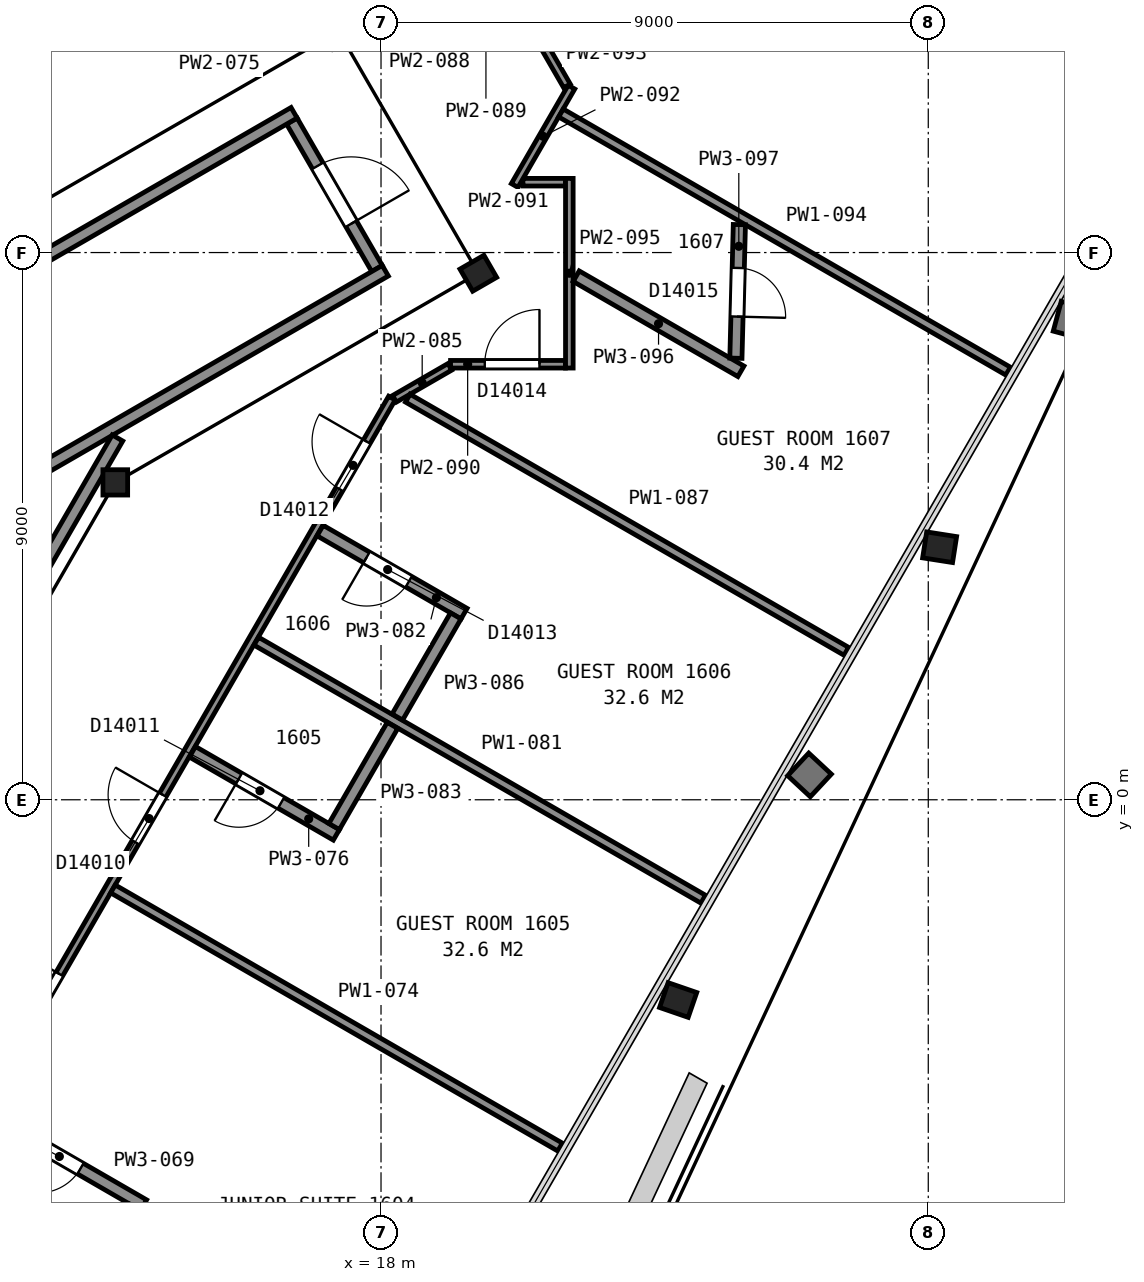
"""IFC4 building model, lengths in metres.
Left out: names, types, materials, properties, quantities, classifications, styles, units other than length and angle.
Written with IfcOpenShell. Run it as: python <this file> out.ifc"""

import sys

from ifc_helpers import new_model, si_unit, direction, frame, frame_2d, origin, origin_2d, place, context, subcontext, project, spatial, rectangle, i_section, extrude, element, fill, save


model = new_model("IFC4")
c1 = context("Model", 3, precision=1e-05, world=origin(), true_north=direction((0.0, 1.0)))
c2 = subcontext(c1, "Body", "Model", "MODEL_VIEW")
j1 = project(units=[si_unit("LENGTHUNIT", "METRE"), si_unit("PLANEANGLEUNIT", "RADIAN")], contexts=[c1])
p1 = place(None, origin())
s1 = spatial("IfcSite", under=j1, at=p1, CompositionType="ELEMENT")
p2 = place(p1, origin())
s2 = spatial("IfcBuilding", under=s1, at=p2, CompositionType="ELEMENT")
p3 = place(p2, frame((0.0, 0.0, 72.8)))
s3 = spatial("IfcBuildingStorey", under=s2, at=p3, CompositionType="ELEMENT", Elevation=72.8)
p4 = place(p3, frame((22.792, -3.261, 0.025), z_axis=(0.080240281001, -0.02768323956, 0.996391055536), x_axis=(-0.500071385104, -0.865832358147, 0.016215344149)))
e1 = element("IfcColumn", 1, at=p4, inside=s3, PredefinedType="COLUMN", context=c2, shape_type="SweptSolid", body=[
    extrude(i_section(OverallWidth=0.432, OverallDepth=0.498, WebThickness=0.056, FlangeThickness=0.089, FilletRadius=0.015, at=origin_2d()), origin(), (0.0, 0.0, 1.0), 3.563),
])
p5 = place(p3, frame((27.082, 4.17, 0.025), z_axis=(0.088495071019, -0.013835916676, 0.995980516785), x_axis=(-0.499820680913, -0.865523193885, 0.032386537004)))
e2 = element("IfcColumn", 2, at=p5, inside=s3, PredefinedType="COLUMN", context=c2, shape_type="SweptSolid", body=[
    extrude(i_section(OverallWidth=0.432, OverallDepth=0.498, WebThickness=0.056, FlangeThickness=0.089, FilletRadius=0.015, at=origin_2d()), origin(), (0.0, 0.0, 1.0), 3.564),
])
p6 = place(p3, frame((13.63, 5.22, 0.0), z_axis=(0.0, 0.0, 1.0), x_axis=(1.0, 0.0, 0.0)))
e3 = element("IfcColumn", 3, at=p6, inside=s3, PredefinedType="COLUMN", context=c2, shape_type="SweptSolid", body=[
    extrude(i_section(OverallWidth=0.406, OverallDepth=0.417, WebThickness=0.03, FlangeThickness=0.048, FilletRadius=0.015, at=origin_2d()), origin(), (0.0, 0.0, 1.0), 3.6),
])
p7 = place(p3, frame((19.6, 8.66, 0.0), z_axis=(0.0, 0.0, 1.0), x_axis=(0.5, -0.866025403784, 0.0)))
e4 = element("IfcColumn", 4, at=p7, inside=s3, PredefinedType="COLUMN", context=c2, shape_type="SweptSolid", body=[
    extrude(i_section(OverallWidth=0.419, OverallDepth=0.455, WebThickness=0.042, FlangeThickness=0.068, FilletRadius=0.015, at=origin_2d()), origin(), (0.0, 0.0, 1.0), 3.6),
])
p8 = place(p3, frame((17.934, 8.738, 0.0), z_axis=(0.0, 0.0, 1.0), x_axis=(-0.49998411664, 0.866034573852, 0.0)))
e5 = element("IfcWall", 5, at=p8, inside=s3, PredefinedType="PARTITIONING", context=c2, shape_type="SweptSolid", body=[
    extrude(rectangle(XDim=2.8, YDim=0.2, at=frame_2d((1.4, 0.0))), origin(), (0.0, 0.0, 1.0), 3.35),
])
p9 = place(p8, frame((0.85, 0.0, 0.0)))
e6 = element("IfcOpeningElement", 6, at=p9, cuts=e5, PredefinedType="OPENING", context=c2, shape_type="SweptSolid", body=[
    extrude(rectangle(XDim=1.1, YDim=2.1, at=frame_2d((0.55, 1.05))), frame((0.0, 0.11, 0.0), z_axis=(0.0, -1.0, 0.0), x_axis=(1.0, 0.0, 0.0)), (0.0, 0.0, 1.0), 0.22),
])
for number, where, z_axis, x_axis in (
    (7, (6.178, 5.299, 0.0), (0.0, 0.0, 1.0), (0.866, 0.5, 0.0)),
    (8, (7.678, 2.701, 0.0), (0.0, 0.0, 1.0), (0.866, 0.5, 0.0)),
):
    element("IfcWall", number, at=place(p3, frame(where, z_axis=z_axis, x_axis=x_axis)), inside=s3, PredefinedType="PARTITIONING", context=c2, shape_type="SweptSolid", body=[
        extrude(rectangle(XDim=12.0, YDim=0.2, at=frame_2d((6.0, 0.0))), origin(), (0.0, 0.0, 1.0), 3.35),
    ])
p10 = place(p3, frame((8.492, -3.012, 0.0), z_axis=(0.0, 0.0, 1.0), x_axis=(0.499972957231, 0.866041016371, 0.0)))
e9 = element("IfcWall", 9, at=p10, inside=s3, PredefinedType="PARTITIONING", context=c2, shape_type="SweptSolid", body=[
    extrude(rectangle(XDim=10.349, YDim=0.2, at=frame_2d((5.174, 0.0))), origin(), (0.0, 0.0, 1.0), 3.35),
])
p11 = place(p3, frame((18.179, 6.606, 0.0), z_axis=(0.0, 0.0, 1.0), x_axis=(-0.500003973642, -0.866023109589, 0.0)))
e10 = element("IfcWall", 10, at=p11, inside=s3, PredefinedType="PARTITIONING", context=c2, shape_type="SweptSolid", body=[
    extrude(rectangle(XDim=28.826, YDim=0.125, at=frame_2d((14.413, 0.0))), origin(), (0.0, 0.0, 1.0), 2.613),
])
p12 = place(p11, frame((21.501, 0.0, 0.0)))
e11 = element("IfcOpeningElement", 11, at=p12, cuts=e10, PredefinedType="OPENING", context=c2, shape_type="SweptSolid", body=[
    extrude(rectangle(XDim=0.9, YDim=2.1, at=frame_2d((0.45, 1.05))), frame((0.0, 0.073, 0.0), z_axis=(0.0, -1.0, 0.0), x_axis=(1.0, 0.0, 0.0)), (0.0, 0.0, 1.0), 0.145),
])
p13 = place(p11, frame((18.894, 0.0, 0.0)))
e12 = element("IfcOpeningElement", 12, at=p13, cuts=e10, PredefinedType="OPENING", context=c2, shape_type="SweptSolid", body=[
    extrude(rectangle(XDim=0.9, YDim=2.1, at=frame_2d((0.45, 1.05))), frame((0.0, 0.073, 0.0), z_axis=(0.0, -1.0, 0.0), x_axis=(1.0, 0.0, 0.0)), (0.0, 0.0, 1.0), 0.145),
])
p14 = place(p11, frame((10.937, 0.0, 0.0)))
e13 = element("IfcOpeningElement", 13, at=p14, cuts=e10, PredefinedType="OPENING", context=c2, shape_type="SweptSolid", body=[
    extrude(rectangle(XDim=0.9, YDim=2.1, at=frame_2d((0.45, 1.05))), frame((0.0, 0.073, 0.0), z_axis=(0.0, -1.0, 0.0), x_axis=(1.0, 0.0, 0.0)), (0.0, 0.0, 1.0), 0.145),
])
p15 = place(p11, frame((7.535, 0.0, 0.0)))
e14 = element("IfcOpeningElement", 14, at=p15, cuts=e10, PredefinedType="OPENING", context=c2, shape_type="SweptSolid", body=[
    extrude(rectangle(XDim=0.9, YDim=2.1, at=frame_2d((0.45, 1.05))), frame((0.0, 0.073, 0.0), z_axis=(0.0, -1.0, 0.0), x_axis=(1.0, 0.0, 0.0)), (0.0, 0.0, 1.0), 0.145),
])
p16 = place(p11, frame((0.827, 0.0, 0.0)))
e15 = element("IfcOpeningElement", 15, at=p16, cuts=e10, PredefinedType="OPENING", context=c2, shape_type="SweptSolid", body=[
    extrude(rectangle(XDim=0.9, YDim=2.1, at=frame_2d((0.45, 1.05))), frame((0.0, 0.073, 0.0), z_axis=(0.0, -1.0, 0.0), x_axis=(1.0, 0.0, 0.0)), (0.0, 0.0, 1.0), 0.145),
])
p17 = place(p3, frame((14.096, -6.667, 0.0), z_axis=(0.0, 0.0, 1.0), x_axis=(-0.866023634079, 0.500003065207, 0.0)))
e16 = element("IfcWall", 16, at=p17, inside=s3, PredefinedType="PARTITIONING", context=c2, shape_type="SweptSolid", body=[
    extrude(rectangle(XDim=3.038, YDim=0.2, at=frame_2d((1.519, 0.0))), origin(), (0.0, 0.0, 1.0), 2.613),
])
p18 = place(p17, frame((1.2, 0.0, 0.0)))
e17 = element("IfcOpeningElement", 17, at=p18, cuts=e16, PredefinedType="OPENING", context=c2, shape_type="SweptSolid", body=[
    extrude(rectangle(XDim=0.8, YDim=2.1, at=frame_2d((0.4, 1.05))), frame((0.0, 0.11, 0.0), z_axis=(0.0, -1.0, 0.0), x_axis=(1.0, 0.0, 0.0)), (0.0, 0.0, 1.0), 0.22),
])
p19 = place(p3, frame((13.591, -1.466, 0.0), z_axis=(0.0, 0.0, 1.0), x_axis=(0.866022790583, -0.50000452617, 0.0)))
e18 = element("IfcWall", 18, at=p19, inside=s3, PredefinedType="PARTITIONING", context=c2, shape_type="SweptSolid", body=[
    extrude(rectangle(XDim=8.491, YDim=0.15, at=frame_2d((4.246, 0.0))), origin(), (0.0, 0.0, 1.0), 2.613),
])
p20 = place(p3, frame((14.898, 0.789, 0.0), z_axis=(0.0, 0.0, 1.0), x_axis=(0.866102295869, -0.499866795347, 0.0)))
e19 = element("IfcWall", 19, at=p20, inside=s3, PredefinedType="PARTITIONING", context=c2, shape_type="SweptSolid", body=[
    extrude(rectangle(XDim=2.733, YDim=0.2, at=frame_2d((1.367, 0.0))), origin(), (0.0, 0.0, 1.0), 2.613),
])
p21 = place(p20, frame((0.883, 0.0, 0.0)))
e20 = element("IfcOpeningElement", 20, at=p21, cuts=e19, PredefinedType="OPENING", context=c2, shape_type="SweptSolid", body=[
    extrude(rectangle(XDim=0.8, YDim=2.1, at=frame_2d((0.4, 1.05))), frame((0.0, 0.11, 0.0), z_axis=(0.0, -1.0, 0.0), x_axis=(1.0, 0.0, 0.0)), (0.0, 0.0, 1.0), 0.22),
])
p22 = place(p3, frame((15.948, 2.608, 0.0), z_axis=(0.0, 0.0, 1.0), x_axis=(0.866059124033, -0.499941590267, 0.0)))
e21 = element("IfcWall", 21, at=p22, inside=s3, PredefinedType="PARTITIONING", context=c2, shape_type="SweptSolid", body=[
    extrude(rectangle(XDim=8.487, YDim=0.15, at=frame_2d((4.243, 0.0))), origin(), (0.0, 0.0, 1.0), 2.613),
])
p23 = place(p3, frame((19.366, 3.061, 0.0), z_axis=(0.0, 0.0, 1.0), x_axis=(-0.866102295869, 0.499866795347, 0.0)))
e22 = element("IfcWall", 22, at=p23, inside=s3, PredefinedType="PARTITIONING", context=c2, shape_type="SweptSolid", body=[
    extrude(rectangle(XDim=2.733, YDim=0.2, at=frame_2d((1.367, 0.0))), origin(), (0.0, 0.0, 1.0), 2.613),
])
p24 = place(p23, frame((1.051, 0.0, 0.0)))
e23 = element("IfcOpeningElement", 23, at=p24, cuts=e22, PredefinedType="OPENING", context=c2, shape_type="SweptSolid", body=[
    extrude(rectangle(XDim=0.8, YDim=2.1, at=frame_2d((0.4, 1.05))), frame((0.0, 0.11, 0.0), z_axis=(0.0, -1.0, 0.0), x_axis=(1.0, 0.0, 0.0)), (0.0, 0.0, 1.0), 0.22),
])
p25 = place(p3, frame((17.229, -0.44, 0.0), z_axis=(0.0, 0.0, 1.0), x_axis=(0.499667418833, 0.866217334482, 0.0)))
e24 = element("IfcWall", 24, at=p25, inside=s3, PredefinedType="PARTITIONING", context=c2, shape_type="SweptSolid", body=[
    extrude(rectangle(XDim=1.92, YDim=0.2, at=frame_2d((0.96, 0.0))), origin(), (0.0, 0.0, 1.0), 2.613),
])
p26 = place(p3, frame((18.222, 6.594, 0.0), z_axis=(0.0, 0.0, 1.0), x_axis=(0.865876245925, 0.500258260045, 0.0)))
e25 = element("IfcWall", 25, at=p26, inside=s3, PredefinedType="PARTITIONING", context=c2, shape_type="SweptSolid", body=[
    extrude(rectangle(XDim=1.052, YDim=0.125, at=frame_2d((0.526, 0.0))), origin(), (0.0, 0.0, 1.0), 2.613),
])
p27 = place(p3, frame((18.269, 1.361, 0.0), z_axis=(0.0, 0.0, 1.0), x_axis=(0.499993829411, 0.866028966346, 0.0)))
e26 = element("IfcWall", 26, at=p27, inside=s3, PredefinedType="PARTITIONING", context=c2, shape_type="SweptSolid", body=[
    extrude(rectangle(XDim=1.921, YDim=0.2, at=frame_2d((0.96, 0.0))), origin(), (0.0, 0.0, 1.0), 2.613),
])
p28 = place(p3, frame((18.44, 6.605, 0.0), z_axis=(0.0, 0.0, 1.0), x_axis=(0.866044499518, -0.49996692376, 0.0)))
e27 = element("IfcWall", 27, at=p28, inside=s3, PredefinedType="PARTITIONING", context=c2, shape_type="SweptSolid", body=[
    extrude(rectangle(XDim=8.328, YDim=0.15, at=frame_2d((4.164, 0.0))), origin(), (0.0, 0.0, 1.0), 2.613),
])
p29 = place(p3, frame((21.032, 7.163, 0.0), z_axis=(0.0, 0.0, 1.0), x_axis=(-1.0, 0.0, 0.0)))
e28 = element("IfcWall", 28, at=p29, inside=s3, PredefinedType="PARTITIONING", context=c2, shape_type="SweptSolid", body=[
    extrude(rectangle(XDim=1.888, YDim=0.125, at=frame_2d((0.944, 0.0))), origin(), (0.0, 0.0, 1.0), 2.613),
])
p30 = place(p29, frame((0.426, 0.0, 0.0)))
e29 = element("IfcOpeningElement", 29, at=p30, cuts=e28, PredefinedType="OPENING", context=c2, shape_type="SweptSolid", body=[
    extrude(rectangle(XDim=0.9, YDim=2.1, at=frame_2d((0.45, 1.05))), frame((0.0, 0.073, 0.0), z_axis=(0.0, -1.0, 0.0), x_axis=(1.0, 0.0, 0.0)), (0.0, 0.0, 1.0), 0.145),
])
p31 = place(p3, frame((20.334, 10.157, 0.0), z_axis=(0.0, 0.0, 1.0), x_axis=(1.0, 0.0, 0.0)))
e30 = element("IfcWall", 30, at=p31, inside=s3, PredefinedType="PARTITIONING", context=c2, shape_type="SweptSolid", body=[
    extrude(rectangle(XDim=0.698, YDim=0.125, at=frame_2d((0.349, 0.0))), origin(), (0.0, 0.0, 1.0), 2.613),
])
p32 = place(p3, frame((20.198, 10.103, 0.0), z_axis=(0.0, 0.0, 1.0), x_axis=(0.500072997275, 0.865983254686, 0.0)))
e31 = element("IfcWall", 31, at=p32, inside=s3, PredefinedType="PARTITIONING", context=c2, shape_type="SweptSolid", body=[
    extrude(rectangle(XDim=1.869, YDim=0.125, at=frame_2d((0.935, 0.0))), origin(), (0.0, 0.0, 1.0), 2.613),
])
p33 = place(p3, frame((20.697, 12.367, 0.0), z_axis=(0.0, 0.0, 1.0), x_axis=(0.500238258503, -0.865887801468, 0.0)))
e32 = element("IfcWall", 32, at=p33, inside=s3, PredefinedType="PARTITIONING", context=c2, shape_type="SweptSolid", body=[
    extrude(rectangle(XDim=0.724, YDim=0.125, at=frame_2d((0.362, 0.0))), origin(), (0.0, 0.0, 1.0), 2.613),
])
p34 = place(p3, frame((20.959, 11.296, 0.0), z_axis=(0.0, 0.0, 1.0), x_axis=(0.866022790583, -0.50000452617, 0.0)))
e33 = element("IfcWall", 33, at=p34, inside=s3, PredefinedType="PARTITIONING", context=c2, shape_type="SweptSolid", body=[
    extrude(rectangle(XDim=8.491, YDim=0.15, at=frame_2d((4.246, 0.0))), origin(), (0.0, 0.0, 1.0), 2.613),
])
p35 = place(p3, frame((21.097, 7.101, 0.0), z_axis=(0.0, 0.0, 1.0), x_axis=(0.0, 1.0, 0.0)))
e34 = element("IfcWall", 34, at=p35, inside=s3, PredefinedType="PARTITIONING", context=c2, shape_type="SweptSolid", body=[
    extrude(rectangle(XDim=3.119, YDim=0.125, at=frame_2d((1.56, 0.0))), origin(), (0.0, 0.0, 1.0), 2.613),
])
p36 = place(p3, frame((21.209, 8.611, 0.0), z_axis=(0.0, 0.0, 1.0), x_axis=(0.866054327916, -0.499949898588, 0.0)))
e35 = element("IfcWall", 35, at=p36, inside=s3, PredefinedType="PARTITIONING", context=c2, shape_type="SweptSolid", body=[
    extrude(rectangle(XDim=3.128, YDim=0.2, at=frame_2d((1.564, 0.0))), origin(), (0.0, 0.0, 1.0), 2.613),
])
p37 = place(p3, frame((23.836, 7.262, 0.0), z_axis=(0.0, 0.0, 1.0), x_axis=(0.025988330811, 0.999662246292, 0.0)))
e36 = element("IfcWall", 36, at=p37, inside=s3, PredefinedType="PARTITIONING", context=c2, shape_type="SweptSolid", body=[
    extrude(rectangle(XDim=2.198, YDim=0.2, at=frame_2d((1.099, 0.0))), origin(), (0.0, 0.0, 1.0), 2.613),
])
p38 = place(p37, frame((0.685, 0.0, 0.0)))
e37 = element("IfcOpeningElement", 37, at=p38, cuts=e36, PredefinedType="OPENING", context=c2, shape_type="SweptSolid", body=[
    extrude(rectangle(XDim=0.8, YDim=2.1, at=frame_2d((0.4, 1.05))), frame((0.0, 0.11, 0.0), z_axis=(0.0, -1.0, 0.0), x_axis=(1.0, 0.0, 0.0)), (0.0, 0.0, 1.0), 0.22),
])
p39 = place(p9, origin())
e38 = element("IfcDoor", 38, at=p39, inside=s3, OperationType="SINGLE_SWING_LEFT", PredefinedType="DOOR", context=c2, shape_type="SweptSolid", body=[
    extrude(rectangle(XDim=1.1, YDim=2.1, at=frame_2d((0.55, 1.05))), frame((0.0, 0.025, 0.0), z_axis=(0.0, -1.0, 0.0), x_axis=(1.0, 0.0, 0.0)), (0.0, 0.0, 1.0), 0.05),
])
fill(e6, e38)
p40 = place(p14, origin())
e39 = element("IfcDoor", 39, at=p40, inside=s3, OperationType="SINGLE_SWING_LEFT", PredefinedType="DOOR", context=c2, shape_type="SweptSolid", body=[
    extrude(rectangle(XDim=0.9, YDim=2.1, at=frame_2d((0.45, 1.05))), frame((0.0, 0.025, 0.0), z_axis=(0.0, -1.0, 0.0), x_axis=(1.0, 0.0, 0.0)), (0.0, 0.0, 1.0), 0.05),
])
fill(e13, e39)
p41 = place(p15, origin())
e40 = element("IfcDoor", 40, at=p41, inside=s3, OperationType="SINGLE_SWING_LEFT", PredefinedType="DOOR", context=c2, shape_type="SweptSolid", body=[
    extrude(rectangle(XDim=0.9, YDim=2.1, at=frame_2d((0.45, 1.05))), frame((0.0, 0.025, 0.0), z_axis=(0.0, -1.0, 0.0), x_axis=(1.0, 0.0, 0.0)), (0.0, 0.0, 1.0), 0.05),
])
fill(e14, e40)
p42 = place(p16, origin())
e41 = element("IfcDoor", 41, at=p42, inside=s3, OperationType="SINGLE_SWING_LEFT", PredefinedType="DOOR", context=c2, shape_type="SweptSolid", body=[
    extrude(rectangle(XDim=0.9, YDim=2.1, at=frame_2d((0.45, 1.05))), frame((0.0, 0.025, 0.0), z_axis=(0.0, -1.0, 0.0), x_axis=(1.0, 0.0, 0.0)), (0.0, 0.0, 1.0), 0.05),
])
fill(e15, e41)
p43 = place(p18, origin())
e42 = element("IfcDoor", 42, at=p43, inside=s3, OperationType="SINGLE_SWING_RIGHT", PredefinedType="DOOR", context=c2, shape_type="SweptSolid", body=[
    extrude(rectangle(XDim=0.8, YDim=2.1, at=frame_2d((0.4, 1.05))), frame((0.0, 0.025, 0.0), z_axis=(0.0, -1.0, 0.0), x_axis=(1.0, 0.0, 0.0)), (0.0, 0.0, 1.0), 0.05),
])
fill(e17, e42)
p44 = place(p21, origin())
e43 = element("IfcDoor", 43, at=p44, inside=s3, OperationType="SINGLE_SWING_LEFT", PredefinedType="DOOR", context=c2, shape_type="SweptSolid", body=[
    extrude(rectangle(XDim=0.8, YDim=2.1, at=frame_2d((0.4, 1.05))), frame((0.0, 0.025, 0.0), z_axis=(0.0, -1.0, 0.0), x_axis=(1.0, 0.0, 0.0)), (0.0, 0.0, 1.0), 0.05),
])
fill(e20, e43)
p45 = place(p24, origin())
e44 = element("IfcDoor", 44, at=p45, inside=s3, OperationType="SINGLE_SWING_RIGHT", PredefinedType="DOOR", context=c2, shape_type="SweptSolid", body=[
    extrude(rectangle(XDim=0.8, YDim=2.1, at=frame_2d((0.4, 1.05))), frame((0.0, 0.025, 0.0), z_axis=(0.0, -1.0, 0.0), x_axis=(1.0, 0.0, 0.0)), (0.0, 0.0, 1.0), 0.05),
])
fill(e23, e44)
p46 = place(p30, origin())
e45 = element("IfcDoor", 45, at=p46, inside=s3, OperationType="SINGLE_SWING_LEFT", PredefinedType="DOOR", context=c2, shape_type="SweptSolid", body=[
    extrude(rectangle(XDim=0.9, YDim=2.1, at=frame_2d((0.45, 1.05))), frame((0.0, 0.025, 0.0), z_axis=(0.0, -1.0, 0.0), x_axis=(1.0, 0.0, 0.0)), (0.0, 0.0, 1.0), 0.05),
])
fill(e29, e45)
p47 = place(p38, origin())
e46 = element("IfcDoor", 46, at=p47, inside=s3, OperationType="SINGLE_SWING_LEFT", PredefinedType="DOOR", context=c2, shape_type="SweptSolid", body=[
    extrude(rectangle(XDim=0.8, YDim=2.1, at=frame_2d((0.4, 1.05))), frame((0.0, 0.025, 0.0), z_axis=(0.0, -1.0, 0.0), x_axis=(1.0, 0.0, 0.0)), (0.0, 0.0, 1.0), 0.05),
])
fill(e37, e46)
save(model, sys.argv[1])
